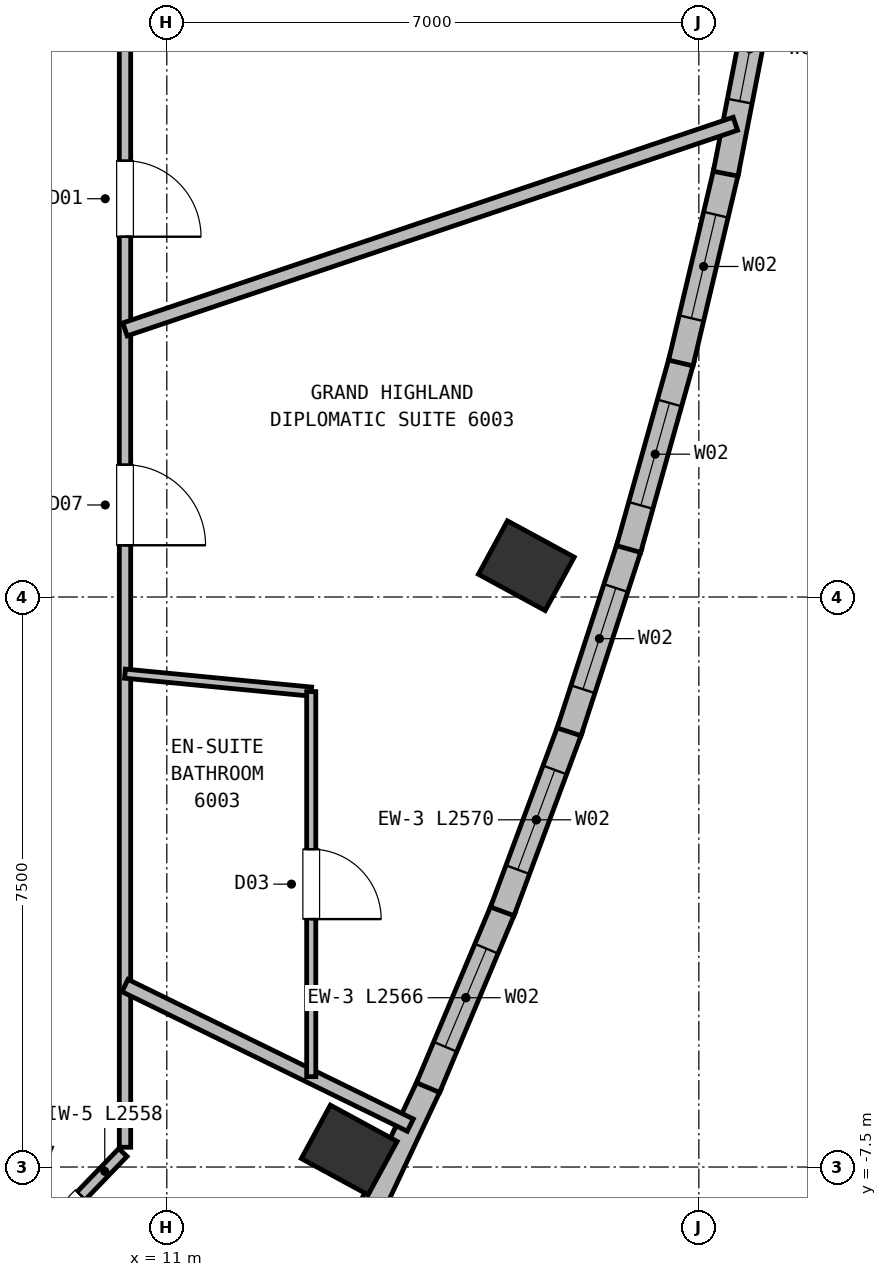
"""IFC4 building model, lengths in metres.
Left out: names, types, materials, properties, quantities, classifications, styles, units other than length and angle.
Written with IfcOpenShell. Run it as: python <this file> out.ifc"""

import sys

from ifc_helpers import new_model, si_unit, direction, frame, frame_2d, origin, origin_2d, place, context, subcontext, project, spatial, rectangle, extrude, element, fill, save


model = new_model("IFC4")
c1 = context("Model", 3, precision=1e-05, world=origin(), true_north=direction((0.0, 1.0)))
c2 = subcontext(c1, "Body", "Model", "MODEL_VIEW")
j1 = project(units=[si_unit("LENGTHUNIT", "METRE"), si_unit("PLANEANGLEUNIT", "RADIAN")], contexts=[c1])
p1 = place(None, origin())
s1 = spatial("IfcSite", under=j1, at=p1, CompositionType="ELEMENT")
p2 = place(p1, origin())
s2 = spatial("IfcBuilding", under=s1, at=p2, CompositionType="ELEMENT")
p3 = place(p2, frame((0.0, 0.0, 228.35)))
s3 = spatial("IfcBuildingStorey", under=s2, at=p3, CompositionType="ELEMENT", Elevation=228.35)
for number, where, z_axis, x_axis in (
    (1, (13.4, -7.276, 0.0), (0.0, 0.0, 1.0), (0.477, 0.879, 0.0)),
    (2, (15.73, 0.412, 0.0), (0.0, 0.0, 1.0), (0.477, 0.879, 0.0)),
):
    element("IfcColumn", number, at=place(p3, frame(where, z_axis=z_axis, x_axis=x_axis)), inside=s3, PredefinedType="COLUMN", context=c2, shape_type="SweptSolid", body=[
        extrude(rectangle(XDim=0.8, YDim=1.0, at=origin_2d()), origin(), (0.0, 0.0, 1.0), 3.8),
    ])
p4 = place(p3, frame((14.458, -6.41, 0.0), z_axis=(0.0, 0.0, 1.0), x_axis=(-0.425774125911, -0.90482948322, 0.0)))
e3 = element("IfcWall", 3, at=p4, inside=s3, PredefinedType="SOLIDWALL", context=c2, shape_type="SweptSolid", body=[
    extrude(rectangle(XDim=2.566, YDim=0.33, at=frame_2d((1.283, 0.0))), origin(), (0.0, 0.0, 1.0), 3.55),
])
p5 = place(p3, frame((15.432, -4.09, 0.0), z_axis=(0.0, 0.0, 1.0), x_axis=(-0.387525243304, -0.921859092162, 0.0)))
e4 = element("IfcWall", 4, at=p5, inside=s3, PredefinedType="SOLIDWALL", context=c2, shape_type="SweptSolid", body=[
    extrude(rectangle(XDim=2.566, YDim=0.33, at=frame_2d((1.283, 0.0))), origin(), (0.0, 0.0, 1.0), 3.55),
])
p6 = place(p5, frame((0.583, 0.0, 0.72)))
e5 = element("IfcOpeningElement", 5, at=p6, cuts=e4, PredefinedType="OPENING", context=c2, shape_type="SweptSolid", body=[
    extrude(rectangle(XDim=1.4, YDim=1.84, at=frame_2d((0.7, 0.92))), frame((0.0, 0.175, 0.0), z_axis=(0.0, -1.0, 0.0), x_axis=(1.0, 0.0, 0.0)), (0.0, 0.0, 1.0), 0.35),
])
p7 = place(p3, frame((16.309, -1.727, 0.0), z_axis=(0.0, 0.0, 1.0), x_axis=(-0.348582368666, -0.937278150954, 0.0)))
e6 = element("IfcWall", 6, at=p7, inside=s3, PredefinedType="SOLIDWALL", context=c2, shape_type="SweptSolid", body=[
    extrude(rectangle(XDim=2.57, YDim=0.33, at=frame_2d((1.285, 0.0))), origin(), (0.0, 0.0, 1.0), 3.55),
])
p8 = place(p7, frame((0.585, 0.0, 0.72)))
e7 = element("IfcOpeningElement", 7, at=p8, cuts=e6, PredefinedType="OPENING", context=c2, shape_type="SweptSolid", body=[
    extrude(rectangle(XDim=1.4, YDim=1.84, at=frame_2d((0.7, 0.92))), frame((0.0, 0.175, 0.0), z_axis=(0.0, -1.0, 0.0), x_axis=(1.0, 0.0, 0.0)), (0.0, 0.0, 1.0), 0.35),
])
p9 = place(p3, frame((17.09, 0.679, 0.0), z_axis=(0.0, 0.0, 1.0), x_axis=(-0.309148141518, -0.951013894008, 0.0)))
e8 = element("IfcWall", 8, at=p9, inside=s3, PredefinedType="SOLIDWALL", context=c2, shape_type="SweptSolid", body=[
    extrude(rectangle(XDim=2.579, YDim=0.33, at=frame_2d((1.29, 0.0))), origin(), (0.0, 0.0, 1.0), 3.55),
])
p10 = place(p9, frame((0.59, 0.0, 0.72)))
e9 = element("IfcOpeningElement", 9, at=p10, cuts=e8, PredefinedType="OPENING", context=c2, shape_type="SweptSolid", body=[
    extrude(rectangle(XDim=1.4, YDim=1.84, at=frame_2d((0.7, 0.92))), frame((0.0, 0.175, 0.0), z_axis=(0.0, -1.0, 0.0), x_axis=(1.0, 0.0, 0.0)), (0.0, 0.0, 1.0), 0.35),
])
p11 = place(p3, frame((17.775, 3.128, 0.0), z_axis=(0.0, 0.0, 1.0), x_axis=(-0.26969279574, -0.962946413839, 0.0)))
e10 = element("IfcWall", 10, at=p11, inside=s3, PredefinedType="SOLIDWALL", context=c2, shape_type="SweptSolid", body=[
    extrude(rectangle(XDim=2.593, YDim=0.33, at=frame_2d((1.296, 0.0))), origin(), (0.0, 0.0, 1.0), 3.55),
])
p12 = place(p11, frame((0.596, 0.0, 0.72)))
e11 = element("IfcOpeningElement", 11, at=p12, cuts=e10, PredefinedType="OPENING", context=c2, shape_type="SweptSolid", body=[
    extrude(rectangle(XDim=1.4, YDim=1.84, at=frame_2d((0.7, 0.92))), frame((0.0, 0.175, 0.0), z_axis=(0.0, -1.0, 0.0), x_axis=(1.0, 0.0, 0.0)), (0.0, 0.0, 1.0), 0.35),
])
p13 = place(p3, frame((18.363, 5.619, 0.0), z_axis=(0.0, 0.0, 1.0), x_axis=(-0.230212303812, -0.973140429318, 0.0)))
e12 = element("IfcWall", 12, at=p13, inside=s3, PredefinedType="SOLIDWALL", context=c2, shape_type="SweptSolid", body=[
    extrude(rectangle(XDim=2.61, YDim=0.33, at=frame_2d((1.305, 0.0))), origin(), (0.0, 0.0, 1.0), 3.55),
])
p14 = place(p13, frame((0.605, 0.0, 0.72)))
e13 = element("IfcOpeningElement", 13, at=p14, cuts=e12, PredefinedType="OPENING", context=c2, shape_type="SweptSolid", body=[
    extrude(rectangle(XDim=1.4, YDim=1.84, at=frame_2d((0.7, 0.92))), frame((0.0, 0.175, 0.0), z_axis=(0.0, -1.0, 0.0), x_axis=(1.0, 0.0, 0.0)), (0.0, 0.0, 1.0), 0.35),
])
p15 = place(p3, frame((18.855, 8.154, 0.0), z_axis=(0.0, 0.0, 1.0), x_axis=(-0.190921803472, -0.981605249048, 0.0)))
e14 = element("IfcWall", 14, at=p15, inside=s3, PredefinedType="SOLIDWALL", context=c2, shape_type="SweptSolid", body=[
    extrude(rectangle(XDim=2.632, YDim=0.33, at=frame_2d((1.316, 0.0))), origin(), (0.0, 0.0, 1.0), 3.55),
])
p16 = place(p15, frame((0.26, 0.0, 0.72)))
e15 = element("IfcOpeningElement", 15, at=p16, cuts=e14, PredefinedType="OPENING", context=c2, shape_type="SweptSolid", body=[
    extrude(rectangle(XDim=1.4, YDim=1.84, at=frame_2d((0.7, 0.92))), frame((0.0, 0.175, 0.0), z_axis=(0.0, -1.0, 0.0), x_axis=(1.0, 0.0, 0.0)), (0.0, 0.0, 1.0), 0.35),
])
p17 = place(p3, frame((10.422, -7.309, 0.0), z_axis=(0.0, 0.0, 1.0), x_axis=(-0.693764562202, -0.720201869085, 0.0)))
e16 = element("IfcWall", 16, at=p17, inside=s3, PredefinedType="PARTITIONING", context=c2, shape_type="SweptSolid", body=[
    extrude(rectangle(XDim=2.558, YDim=0.15, at=frame_2d((1.279, 0.0))), origin(), (0.0, 0.0, 1.0), 3.23),
])
p18 = place(p17, frame((0.789, 0.0, 0.0)))
e17 = element("IfcOpeningElement", 17, at=p18, cuts=e16, PredefinedType="OPENING", context=c2, shape_type="SweptSolid", body=[
    extrude(rectangle(XDim=1.06, YDim=2.15, at=frame_2d((0.53, 1.075))), frame((0.0, 0.085, 0.0), z_axis=(0.0, -1.0, 0.0), x_axis=(1.0, 0.0, 0.0)), (0.0, 0.0, 1.0), 0.17),
])
p19 = place(p3, frame((10.45, 7.24, 0.0), z_axis=(0.0, 0.0, 1.0), x_axis=(0.0, -1.0, 0.0)))
e18 = element("IfcWall", 18, at=p19, inside=s3, PredefinedType="PARTITIONING", context=c2, shape_type="SweptSolid", body=[
    extrude(rectangle(XDim=14.48, YDim=0.15, at=frame_2d((7.24, 0.0))), origin(), (0.0, 0.0, 1.0), 3.55),
])
p20 = place(p19, frame((5.499, 0.0, 0.0)))
e19 = element("IfcOpeningElement", 19, at=p20, cuts=e18, PredefinedType="OPENING", context=c2, shape_type="SweptSolid", body=[
    extrude(rectangle(XDim=1.06, YDim=2.15, at=frame_2d((0.53, 1.075))), frame((0.0, 0.085, 0.0), z_axis=(0.0, -1.0, 0.0), x_axis=(1.0, 0.0, 0.0)), (0.0, 0.0, 1.0), 0.17),
])
p21 = place(p19, frame((1.5, 0.0, 0.0)))
e20 = element("IfcOpeningElement", 20, at=p21, cuts=e18, PredefinedType="OPENING", context=c2, shape_type="SweptSolid", body=[
    extrude(rectangle(XDim=1.0, YDim=2.15, at=frame_2d((0.5, 1.075))), frame((0.0, 0.085, 0.0), z_axis=(0.0, -1.0, 0.0), x_axis=(1.0, 0.0, 0.0)), (0.0, 0.0, 1.0), 0.17),
])
p22 = place(p3, frame((10.45, -5.112, 0.0), z_axis=(0.0, 0.0, 1.0), x_axis=(0.89827266013, -0.439438537298, 0.0)))
e21 = element("IfcWall", 21, at=p22, inside=s3, PredefinedType="PARTITIONING", context=c2, shape_type="SweptSolid", body=[
    extrude(rectangle(XDim=4.179, YDim=0.18, at=frame_2d((2.089, 0.0))), origin(), (0.0, 0.0, 1.0), 3.55),
])
p23 = place(p3, frame((10.45, -1.008, 0.0), z_axis=(0.0, 0.0, 1.0), x_axis=(0.995370238569, -0.096114973709, 0.0)))
e22 = element("IfcWall", 22, at=p23, inside=s3, PredefinedType="PARTITIONING", context=c2, shape_type="SweptSolid", body=[
    extrude(rectangle(XDim=2.461, YDim=0.12, at=frame_2d((1.231, 0.0))), origin(), (0.0, 0.0, 1.0), 3.55),
])
p24 = place(p3, frame((12.9, -1.245, 0.0), z_axis=(0.0, 0.0, 1.0), x_axis=(0.0, -1.0, 0.0)))
e23 = element("IfcWall", 23, at=p24, inside=s3, PredefinedType="PARTITIONING", context=c2, shape_type="SweptSolid", body=[
    extrude(rectangle(XDim=5.066, YDim=0.12, at=frame_2d((2.533, 0.0))), origin(), (0.0, 0.0, 1.0), 3.23),
])
p25 = place(p24, frame((2.073, 0.0, 0.0)))
e24 = element("IfcOpeningElement", 24, at=p25, cuts=e23, PredefinedType="OPENING", context=c2, shape_type="SweptSolid", body=[
    extrude(rectangle(XDim=0.92, YDim=2.1, at=frame_2d((0.46, 1.05))), frame((0.0, 0.07, 0.0), z_axis=(0.0, -1.0, 0.0), x_axis=(1.0, 0.0, 0.0)), (0.0, 0.0, 1.0), 0.14),
])
p26 = place(p3, frame((10.45, 3.521, 0.0), z_axis=(0.0, 0.0, 1.0), x_axis=(0.947649729023, 0.319311745919, 0.0)))
e25 = element("IfcWall", 25, at=p26, inside=s3, PredefinedType="PARTITIONING", context=c2, shape_type="SweptSolid", body=[
    extrude(rectangle(XDim=8.474, YDim=0.18, at=frame_2d((4.237, 0.0))), origin(), (0.0, 0.0, 1.0), 3.55),
])
p27 = place(p6, origin())
e26 = element("IfcWindow", 26, at=p27, inside=s3, PartitioningType="SINGLE_PANEL", PredefinedType="WINDOW", context=c2, shape_type="SweptSolid", body=[
    extrude(rectangle(XDim=1.4, YDim=1.84, at=frame_2d((0.7, 0.92))), frame((0.0, 0.03, 0.0), z_axis=(0.0, -1.0, 0.0), x_axis=(1.0, 0.0, 0.0)), (0.0, 0.0, 1.0), 0.06),
])
fill(e5, e26)
p28 = place(p8, origin())
e27 = element("IfcWindow", 27, at=p28, inside=s3, PartitioningType="SINGLE_PANEL", PredefinedType="WINDOW", context=c2, shape_type="SweptSolid", body=[
    extrude(rectangle(XDim=1.4, YDim=1.84, at=frame_2d((0.7, 0.92))), frame((0.0, 0.03, 0.0), z_axis=(0.0, -1.0, 0.0), x_axis=(1.0, 0.0, 0.0)), (0.0, 0.0, 1.0), 0.06),
])
fill(e7, e27)
p29 = place(p10, origin())
e28 = element("IfcWindow", 28, at=p29, inside=s3, PartitioningType="SINGLE_PANEL", PredefinedType="WINDOW", context=c2, shape_type="SweptSolid", body=[
    extrude(rectangle(XDim=1.4, YDim=1.84, at=frame_2d((0.7, 0.92))), frame((0.0, 0.03, 0.0), z_axis=(0.0, -1.0, 0.0), x_axis=(1.0, 0.0, 0.0)), (0.0, 0.0, 1.0), 0.06),
])
fill(e9, e28)
p30 = place(p12, origin())
e29 = element("IfcWindow", 29, at=p30, inside=s3, PartitioningType="SINGLE_PANEL", PredefinedType="WINDOW", context=c2, shape_type="SweptSolid", body=[
    extrude(rectangle(XDim=1.4, YDim=1.84, at=frame_2d((0.7, 0.92))), frame((0.0, 0.03, 0.0), z_axis=(0.0, -1.0, 0.0), x_axis=(1.0, 0.0, 0.0)), (0.0, 0.0, 1.0), 0.06),
])
fill(e11, e29)
p31 = place(p14, origin())
e30 = element("IfcWindow", 30, at=p31, inside=s3, PartitioningType="SINGLE_PANEL", PredefinedType="WINDOW", context=c2, shape_type="SweptSolid", body=[
    extrude(rectangle(XDim=1.4, YDim=1.84, at=frame_2d((0.7, 0.92))), frame((0.0, 0.03, 0.0), z_axis=(0.0, -1.0, 0.0), x_axis=(1.0, 0.0, 0.0)), (0.0, 0.0, 1.0), 0.06),
])
fill(e13, e30)
p32 = place(p16, origin())
e31 = element("IfcWindow", 31, at=p32, inside=s3, PartitioningType="SINGLE_PANEL", PredefinedType="WINDOW", context=c2, shape_type="SweptSolid", body=[
    extrude(rectangle(XDim=1.4, YDim=1.84, at=frame_2d((0.7, 0.92))), frame((0.0, 0.03, 0.0), z_axis=(0.0, -1.0, 0.0), x_axis=(1.0, 0.0, 0.0)), (0.0, 0.0, 1.0), 0.06),
])
fill(e15, e31)
p33 = place(p25, origin())
e32 = element("IfcDoor", 32, at=p33, inside=s3, OperationType="SINGLE_SWING_RIGHT", PredefinedType="DOOR", context=c2, shape_type="SweptSolid", body=[
    extrude(rectangle(XDim=0.92, YDim=2.1, at=frame_2d((0.46, 1.05))), frame((0.0, 0.025, 0.0), z_axis=(0.0, -1.0, 0.0), x_axis=(1.0, 0.0, 0.0)), (0.0, 0.0, 1.0), 0.05),
])
fill(e24, e32)
p34 = place(p18, origin())
e33 = element("IfcDoor", 33, at=p34, inside=s3, OperationType="SINGLE_SWING_LEFT", PredefinedType="DOOR", context=c2, shape_type="SweptSolid", body=[
    extrude(rectangle(XDim=1.06, YDim=2.15, at=frame_2d((0.53, 1.075))), frame((0.0, 0.025, 0.0), z_axis=(0.0, -1.0, 0.0), x_axis=(1.0, 0.0, 0.0)), (0.0, 0.0, 1.0), 0.05),
])
fill(e17, e33)
p35 = place(p20, origin())
e34 = element("IfcDoor", 34, at=p35, inside=s3, OperationType="SINGLE_SWING_RIGHT", PredefinedType="DOOR", context=c2, shape_type="SweptSolid", body=[
    extrude(rectangle(XDim=1.06, YDim=2.15, at=frame_2d((0.53, 1.075))), frame((0.0, 0.025, 0.0), z_axis=(0.0, -1.0, 0.0), x_axis=(1.0, 0.0, 0.0)), (0.0, 0.0, 1.0), 0.05),
])
fill(e19, e34)
p36 = place(p21, origin())
e35 = element("IfcDoor", 35, at=p36, inside=s3, OperationType="SINGLE_SWING_RIGHT", PredefinedType="DOOR", context=c2, shape_type="SweptSolid", body=[
    extrude(rectangle(XDim=1.0, YDim=2.15, at=frame_2d((0.5, 1.075))), frame((0.0, 0.025, 0.0), z_axis=(0.0, -1.0, 0.0), x_axis=(1.0, 0.0, 0.0)), (0.0, 0.0, 1.0), 0.05),
])
fill(e20, e35)
save(model, sys.argv[1])
